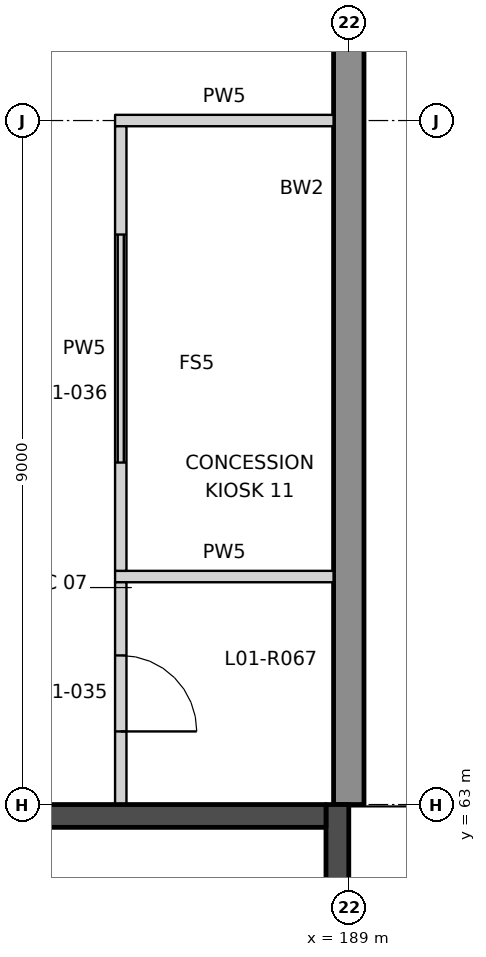
"""IFC4 building model, lengths in metres.
Left out: names, types, materials, properties, quantities, classifications, styles, units other than length and angle.
Written with IfcOpenShell. Run it as: python <this file> out.ifc"""

import sys

from ifc_helpers import new_model, si_unit, direction, frame, frame_2d, origin, place, context, subcontext, project, spatial, rectangle, extrude, element, fill, save


model = new_model("IFC4")
c1 = context("Model", 3, precision=1e-05, world=origin(), true_north=direction((0.0, 1.0)))
c2 = subcontext(c1, "Body", "Model", "MODEL_VIEW")
j1 = project(units=[si_unit("LENGTHUNIT", "METRE"), si_unit("PLANEANGLEUNIT", "RADIAN")], contexts=[c1])
p1 = place(None, origin())
s1 = spatial("IfcSite", under=j1, at=p1, CompositionType="ELEMENT")
p2 = place(p1, origin())
s2 = spatial("IfcBuilding", under=s1, at=p2, CompositionType="ELEMENT")
p3 = place(p2, frame((0.0, 0.0, 7.0)))
s3 = spatial("IfcBuildingStorey", under=s2, at=p3, CompositionType="ELEMENT", Elevation=7.0)
p4 = place(p3, frame((189.0, 63.0, 0.0), z_axis=(0.0, 0.0, 1.0), x_axis=(0.0, 1.0, 0.0)))
e1 = element("IfcWall", 1, at=p4, inside=s3, PredefinedType="SOLIDWALL", context=c2, shape_type="SweptSolid", body=[
    extrude(rectangle(XDim=16.2, YDim=0.4, at=frame_2d((8.1, 0.0))), origin(), (0.0, 0.0, 1.0), 4.5),
])
p5 = place(p3, frame((185.925, 66.0, 0.0), z_axis=(0.0, 0.0, 1.0), x_axis=(1.0, 0.0, 0.0)))
e2 = element("IfcWall", 2, at=p5, inside=s3, PredefinedType="PARTITIONING", context=c2, shape_type="SweptSolid", body=[
    extrude(rectangle(XDim=2.875, YDim=0.15, at=frame_2d((1.438, 0.0))), origin(), (0.0, 0.0, 1.0), 4.5),
])
p6 = place(p3, frame((185.925, 72.0, 0.0), z_axis=(0.0, 0.0, 1.0), x_axis=(1.0, 0.0, 0.0)))
e3 = element("IfcWall", 3, at=p6, inside=s3, PredefinedType="PARTITIONING", context=c2, shape_type="SweptSolid", body=[
    extrude(rectangle(XDim=2.875, YDim=0.15, at=frame_2d((1.438, 0.0))), origin(), (0.0, 0.0, 1.0), 3.25),
])
p7 = place(p3, frame((186.0, 63.0, 0.0), z_axis=(0.0, 0.0, 1.0), x_axis=(0.0, 1.0, 0.0)))
e4 = element("IfcWall", 4, at=p7, inside=s3, PredefinedType="PARTITIONING", context=c2, shape_type="SweptSolid", body=[
    extrude(rectangle(XDim=2.925, YDim=0.15, at=frame_2d((1.462, 0.0))), origin(), (0.0, 0.0, 1.0), 4.5),
])
p8 = place(p7, frame((0.962, 0.0, 0.0)))
e5 = element("IfcOpeningElement", 5, at=p8, cuts=e4, PredefinedType="OPENING", context=c2, shape_type="SweptSolid", body=[
    extrude(rectangle(XDim=1.0, YDim=2.1, at=frame_2d((0.5, 1.05))), frame((0.0, 0.085, 0.0), z_axis=(0.0, -1.0, 0.0), x_axis=(1.0, 0.0, 0.0)), (0.0, 0.0, 1.0), 0.17),
])
p9 = place(p3, frame((186.0, 66.075, 0.0), z_axis=(0.0, 0.0, 1.0), x_axis=(0.0, 1.0, 0.0)))
e6 = element("IfcWall", 6, at=p9, inside=s3, PredefinedType="PARTITIONING", context=c2, shape_type="SweptSolid", body=[
    extrude(rectangle(XDim=5.85, YDim=0.15, at=frame_2d((2.925, 0.0))), origin(), (0.0, 0.0, 1.0), 4.5),
])
p10 = place(p9, frame((1.425, 0.0, 0.0)))
e7 = element("IfcOpeningElement", 7, at=p10, cuts=e6, PredefinedType="OPENING", context=c2, shape_type="SweptSolid", body=[
    extrude(rectangle(XDim=3.0, YDim=2.4, at=frame_2d((1.5, 1.2))), frame((0.0, 0.085, 0.0), z_axis=(0.0, -1.0, 0.0), x_axis=(1.0, 0.0, 0.0)), (0.0, 0.0, 1.0), 0.17),
])
p11 = place(p3, frame((188.85, 63.0, 0.0), z_axis=(0.0, 0.0, 1.0), x_axis=(0.0, -1.0, 0.0)))
e8 = element("IfcWall", 8, at=p11, inside=s3, PredefinedType="SHEAR", context=c2, shape_type="SweptSolid", body=[
    extrude(rectangle(XDim=18.0, YDim=0.3, at=frame_2d((9.0, 0.0))), origin(), (0.0, 0.0, 1.0), 4.5),
])
p12 = place(p3, frame((180.3, 62.85, 0.0), z_axis=(0.0, 0.0, 1.0), x_axis=(1.0, 0.0, 0.0)))
e9 = element("IfcWall", 9, at=p12, inside=s3, PredefinedType="SHEAR", context=c2, shape_type="SweptSolid", body=[
    extrude(rectangle(XDim=8.4, YDim=0.3, at=frame_2d((4.2, 0.0))), origin(), (0.0, 0.0, 1.0), 4.5),
])
p13 = place(p8, frame((1.0, 0.0, 0.0), z_axis=(0.0, 0.0, 1.0), x_axis=(-1.0, 0.0, 0.0)))
e10 = element("IfcDoor", 10, at=p13, inside=s3, OperationType="SINGLE_SWING_RIGHT", PredefinedType="DOOR", context=c2, shape_type="SweptSolid", body=[
    extrude(rectangle(XDim=1.0, YDim=2.1, at=frame_2d((0.5, 1.05))), frame((0.0, 0.025, 0.0), z_axis=(0.0, -1.0, 0.0), x_axis=(1.0, 0.0, 0.0)), (0.0, 0.0, 1.0), 0.05),
])
fill(e5, e10)
p14 = place(p10, origin())
e11 = element("IfcDoor", 11, at=p14, inside=s3, OperationType="ROLLINGUP", PredefinedType="DOOR", context=c2, shape_type="SweptSolid", body=[
    extrude(rectangle(XDim=3.0, YDim=2.4, at=frame_2d((1.5, 1.2))), frame((0.0, 0.025, 0.0), z_axis=(0.0, -1.0, 0.0), x_axis=(1.0, 0.0, 0.0)), (0.0, 0.0, 1.0), 0.05),
])
fill(e7, e11)
save(model, sys.argv[1])
